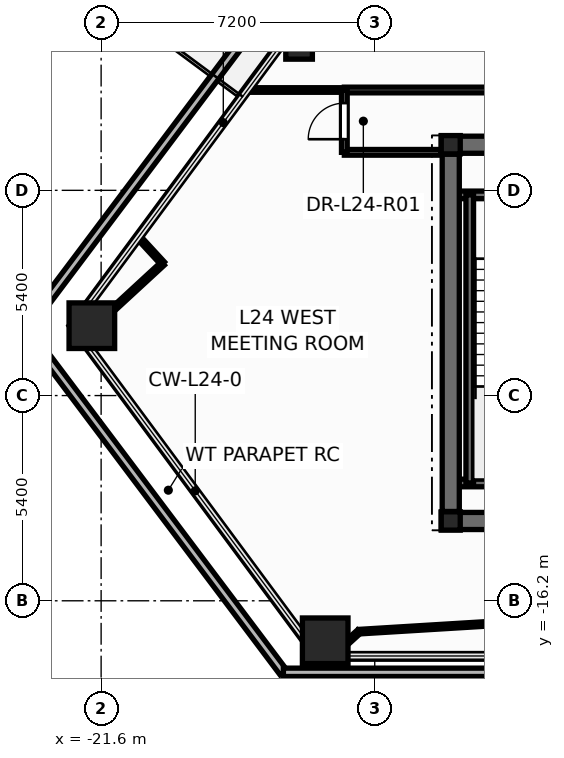
"""IFC4 building model, lengths in metres.
Left out: names, types, materials, properties, quantities, classifications, styles, units other than length and angle.
Written with IfcOpenShell. Run it as: python <this file> out.ifc"""

import sys

from ifc_helpers import new_model, si_unit, direction, frame, frame_2d, origin, origin_2d, place, context, subcontext, project, spatial, rectangle, hollow_rectangle, hollow_circle, i_section, extrude, element, fill, save


model = new_model("IFC4")
c1 = context("Model", 3, precision=1e-05, world=origin(), true_north=direction((0.0, 1.0)))
c2 = subcontext(c1, "Body", "Model", "MODEL_VIEW")
j1 = project(units=[si_unit("LENGTHUNIT", "METRE"), si_unit("PLANEANGLEUNIT", "RADIAN")], contexts=[c1])
p1 = place(None, origin())
s1 = spatial("IfcSite", under=j1, at=p1, CompositionType="ELEMENT")
p2 = place(p1, origin())
s2 = spatial("IfcBuilding", under=s1, at=p2, CompositionType="ELEMENT")
p3 = place(p2, frame((0.0, 0.0, 94.8)))
s3 = spatial("IfcBuildingStorey", under=s2, at=p3, CompositionType="ELEMENT", Elevation=94.8)
for number, where, z_axis, x_axis in (
    (1, (-21.844, -8.961, 0.0), (0.0, 0.0, 1.0), (1.0, 0.0, 0.0)),
    (2, (-15.704, -17.252, 0.0), (0.0, 0.0, 1.0), (1.0, 0.0, 0.0)),
):
    element("IfcColumn", number, at=place(p3, frame(where, z_axis=z_axis, x_axis=x_axis)), inside=s3, PredefinedType="COLUMN", context=c2, shape_type="SweptSolid", body=[
        extrude(hollow_rectangle(XDim=1.2, YDim=1.2, WallThickness=0.055, at=origin_2d()), origin(), (0.0, 0.0, 1.0), 4.8),
    ])
p4 = place(p3, frame((-16.391, -1.599, 0.0), z_axis=(0.0, 0.0, 1.0), x_axis=(1.0, 0.0, 0.0)))
e3 = element("IfcColumn", 3, at=p4, inside=s3, PredefinedType="COLUMN", context=c2, shape_type="SweptSolid", body=[
    extrude(hollow_circle(Radius=0.35, WallThickness=0.03, at=origin_2d()), origin(), (0.0, 0.0, 1.0), 4.8),
])
for number, where, z_axis, x_axis in (
    (4, (-12.4, -14.1, 0.0), (0.0, 0.0, 1.0), (1.0, 0.0, 0.0)),
    (5, (-12.4, -4.2, 0.0), (0.0, 0.0, 1.0), (1.0, 0.0, 0.0)),
):
    element("IfcColumn", number, at=place(p3, frame(where, z_axis=z_axis, x_axis=x_axis)), inside=s3, PredefinedType="COLUMN", context=c2, shape_type="SweptSolid", body=[
        extrude(i_section(OverallWidth=0.5, OverallDepth=0.482, WebThickness=0.04, FlangeThickness=0.045, at=origin_2d()), origin(), (0.0, 0.0, 1.0), 4.8),
    ])
p5 = place(p3, frame((-23.595, -9.052, -0.02), z_axis=(0.0, 0.0, 1.0), x_axis=(0.601053883543, -0.79920850163, 0.0)))
e6 = element("IfcWall", 6, at=p5, inside=s3, PredefinedType="PARAPET", context=c2, shape_type="SweptSolid", body=[
    extrude(rectangle(XDim=11.299, YDim=0.22, at=frame_2d((5.65, 0.0))), origin(), (0.0, 0.0, 1.0), 1.17),
])
p6 = place(p3, frame((-16.803, -18.082, -0.02), z_axis=(0.0, 0.0, 1.0), x_axis=(1.0, 0.0, 0.0)))
e7 = element("IfcWall", 7, at=p6, inside=s3, PredefinedType="PARAPET", context=c2, shape_type="SweptSolid", body=[
    extrude(rectangle(XDim=33.607, YDim=0.22, at=frame_2d((16.803, 0.0))), origin(), (0.0, 0.0, 1.0), 1.17),
])
p7 = place(p3, frame((-6.827, 13.245, -0.02), z_axis=(0.0, 0.0, 1.0), x_axis=(-0.601046808783, -0.799213822235, 0.0)))
e8 = element("IfcWall", 8, at=p7, inside=s3, PredefinedType="PARAPET", context=c2, shape_type="SweptSolid", body=[
    extrude(rectangle(XDim=27.898, YDim=0.22, at=frame_2d((13.949, 0.0))), origin(), (0.0, 0.0, 1.0), 1.17),
])
p8 = place(p3, frame((-12.65, -14.1, 0.0), z_axis=(0.0, 0.0, 1.0), x_axis=(1.0, 0.0, 0.0)))
e9 = element("IfcWall", 9, at=p8, inside=s3, PredefinedType="SHEAR", context=c2, shape_type="SweptSolid", body=[
    extrude(rectangle(XDim=25.3, YDim=0.45, at=frame_2d((12.65, 0.0))), origin(), (0.0, 0.0, 1.0), 4.8),
])
p9 = place(p3, frame((-12.65, -4.2, 0.0), z_axis=(0.0, 0.0, 1.0), x_axis=(1.0, 0.0, 0.0)))
e10 = element("IfcWall", 10, at=p9, inside=s3, PredefinedType="SHEAR", context=c2, shape_type="SweptSolid", body=[
    extrude(rectangle(XDim=25.3, YDim=0.45, at=frame_2d((12.65, 0.0))), origin(), (0.0, 0.0, 1.0), 4.8),
])
p10 = place(p9, frame((1.85, 0.0, 0.0)))
e11 = element("IfcOpeningElement", 11, at=p10, cuts=e10, PredefinedType="OPENING", context=c2, shape_type="SweptSolid", body=[
    extrude(rectangle(XDim=0.756, YDim=2.054, at=frame_2d((0.375, 1.027))), frame((0.0, 0.235, 0.0), z_axis=(0.0, -1.0, 0.0), x_axis=(1.0, 0.0, 0.0)), (0.0, 0.0, 1.0), 0.47),
])
p11 = place(p9, frame((22.65, 0.0, 0.0)))
e12 = element("IfcOpeningElement", 12, at=p11, cuts=e10, PredefinedType="OPENING", context=c2, shape_type="SweptSolid", body=[
    extrude(rectangle(XDim=0.756, YDim=2.054, at=frame_2d((0.375, 1.027))), frame((0.0, 0.235, 0.0), z_axis=(0.0, -1.0, 0.0), x_axis=(1.0, 0.0, 0.0)), (0.0, 0.0, 1.0), 0.47),
])
p12 = place(p9, frame((5.85, 0.0, 0.0)))
e13 = element("IfcOpeningElement", 13, at=p12, cuts=e10, PredefinedType="OPENING", context=c2, shape_type="SweptSolid", body=[
    extrude(rectangle(XDim=1.006, YDim=2.104, at=frame_2d((0.5, 1.052))), frame((0.0, 0.235, 0.0), z_axis=(0.0, -1.0, 0.0), x_axis=(1.0, 0.0, 0.0)), (0.0, 0.0, 1.0), 0.47),
])
p13 = place(p9, frame((10.35, 0.0, 0.0)))
e14 = element("IfcOpeningElement", 14, at=p13, cuts=e10, PredefinedType="OPENING", context=c2, shape_type="SweptSolid", body=[
    extrude(rectangle(XDim=1.406, YDim=2.154, at=frame_2d((0.7, 1.077))), frame((0.0, 0.235, 0.0), z_axis=(0.0, -1.0, 0.0), x_axis=(1.0, 0.0, 0.0)), (0.0, 0.0, 1.0), 0.47),
])
p14 = place(p9, frame((18.45, 0.0, 0.0)))
e15 = element("IfcOpeningElement", 15, at=p14, cuts=e10, PredefinedType="OPENING", context=c2, shape_type="SweptSolid", body=[
    extrude(rectangle(XDim=1.006, YDim=2.104, at=frame_2d((0.5, 1.052))), frame((0.0, 0.235, 0.0), z_axis=(0.0, -1.0, 0.0), x_axis=(1.0, 0.0, 0.0)), (0.0, 0.0, 1.0), 0.47),
])
for number, where, z_axis, x_axis in (
    (16, (-12.35, -5.52, 0.0), (0.0, 0.0, 1.0), (1.0, 0.0, 0.0)),
    (17, (-12.35, -13.1, 0.0), (0.0, 0.0, 1.0), (1.0, 0.0, 0.0)),
):
    element("IfcWall", number, at=place(p3, frame(where, z_axis=z_axis, x_axis=x_axis)), inside=s3, PredefinedType="SOLIDWALL", context=c2, shape_type="SweptSolid", body=[
        extrude(rectangle(XDim=3.87, YDim=0.2, at=frame_2d((1.935, 0.0))), origin(), (0.0, 0.0, 1.0), 4.8),
    ])
p15 = place(p3, frame((-11.9, -13.1, 0.0), z_axis=(0.0, 0.0, 1.0), x_axis=(0.0, 1.0, 0.0)))
e18 = element("IfcWall", 18, at=p15, inside=s3, PredefinedType="SOLIDWALL", context=c2, shape_type="SweptSolid", body=[
    extrude(rectangle(XDim=7.58, YDim=0.2, at=frame_2d((3.79, 0.0))), origin(), (0.0, 0.0, 1.0), 4.8),
])
p16 = place(p3, frame((-12.4, -13.85, 0.0), z_axis=(0.0, 0.0, 1.0), x_axis=(0.0, 1.0, 0.0)))
e19 = element("IfcWall", 19, at=p16, inside=s3, PredefinedType="SHEAR", context=c2, shape_type="SweptSolid", body=[
    extrude(rectangle(XDim=9.4, YDim=0.45, at=frame_2d((4.7, 0.0))), origin(), (0.0, 0.0, 1.0), 4.8),
])
p17 = place(p3, frame((-15.2, -2.76, 0.0), z_axis=(0.0, 0.0, 1.0), x_axis=(1.0, 0.0, 0.0)))
e20 = element("IfcWall", 20, at=p17, inside=s3, PredefinedType="PARTITIONING", context=c2, shape_type="SweptSolid", body=[
    extrude(rectangle(XDim=12.86, YDim=0.15, at=frame_2d((6.43, 0.0))), origin(), (0.0, 0.0, 1.0), 3.525),
])
p18 = place(p17, frame((4.436, 0.0, 0.0)))
e21 = element("IfcOpeningElement", 21, at=p18, cuts=e20, PredefinedType="OPENING", context=c2, shape_type="SweptSolid", body=[
    extrude(rectangle(XDim=0.956, YDim=2.104, at=frame_2d((0.475, 1.052))), frame((0.0, 0.085, 0.0), z_axis=(0.0, -1.0, 0.0), x_axis=(1.0, 0.0, 0.0)), (0.0, 0.0, 1.0), 0.17),
])
p19 = place(p3, frame((-14.815, -17.012, 0.0), z_axis=(0.0, 0.0, 1.0), x_axis=(0.998142834765, 0.060917004252, 0.0)))
e22 = element("IfcWall", 22, at=p19, inside=s3, PredefinedType="PARTITIONING", context=c2, shape_type="SweptSolid", body=[
    extrude(rectangle(XDim=3.651, YDim=0.12, at=frame_2d((1.826, 0.0))), origin(), (0.0, 0.0, 1.0), 4.55),
])
p20 = place(p3, frame((-15.2, -4.4, 0.0), z_axis=(0.0, 0.0, 1.0), x_axis=(1.0, 0.0, 0.0)))
e23 = element("IfcWall", 23, at=p20, inside=s3, PredefinedType="PARTITIONING", context=c2, shape_type="SweptSolid", body=[
    extrude(rectangle(XDim=2.548, YDim=0.15, at=frame_2d((1.274, 0.0))), origin(), (0.0, 0.0, 1.0), 3.525),
])
p21 = place(p3, frame((-17.749, -2.76, 0.0), z_axis=(0.0, 0.0, 1.0), x_axis=(1.0, 0.0, 0.0)))
e24 = element("IfcWall", 24, at=p21, inside=s3, PredefinedType="PARTITIONING", context=c2, shape_type="SweptSolid", body=[
    extrude(rectangle(XDim=2.549, YDim=0.12, at=frame_2d((1.274, 0.0))), origin(), (0.0, 0.0, 1.0), 3.913),
])
p22 = place(p3, frame((-19.977, -7.325, 0.0), z_axis=(0.0, 0.0, 1.0), x_axis=(-0.735328734055, -0.677710596695, 0.0)))
e25 = element("IfcWall", 25, at=p22, inside=s3, PredefinedType="PARTITIONING", context=c2, shape_type="SweptSolid", body=[
    extrude(rectangle(XDim=2.013, YDim=0.12, at=frame_2d((1.006, 0.0))), origin(), (0.0, 0.0, 1.0), 3.525),
])
p23 = place(p3, frame((-15.2, -4.4, 0.0), z_axis=(0.0, 0.0, 1.0), x_axis=(0.0, 1.0, 0.0)))
e26 = element("IfcWall", 26, at=p23, inside=s3, PredefinedType="PARTITIONING", context=c2, shape_type="SweptSolid", body=[
    extrude(rectangle(XDim=1.64, YDim=0.15, at=frame_2d((0.82, 0.0))), origin(), (0.0, 0.0, 1.0), 4.55),
])
p24 = place(p23, frame((0.345, 0.0, 0.0)))
e27 = element("IfcOpeningElement", 27, at=p24, cuts=e26, PredefinedType="OPENING", context=c2, shape_type="SweptSolid", body=[
    extrude(rectangle(XDim=0.956, YDim=2.104, at=frame_2d((0.475, 1.052))), frame((0.0, 0.085, 0.0), z_axis=(0.0, -1.0, 0.0), x_axis=(1.0, 0.0, 0.0)), (0.0, 0.0, 1.0), 0.17),
])
p25 = place(p3, frame((-20.609, -6.639, 0.0), z_axis=(0.0, 0.0, 1.0), x_axis=(0.677725423192, -0.735315069041, 0.0)))
e28 = element("IfcWall", 28, at=p25, inside=s3, PredefinedType="PARTITIONING", context=c2, shape_type="SweptSolid", body=[
    extrude(rectangle(XDim=0.933, YDim=0.12, at=frame_2d((0.466, 0.0))), origin(), (0.0, 0.0, 1.0), 3.913),
])
p26 = place(p3, frame((-15.448, -17.585, 0.0), z_axis=(0.0, 0.0, 1.0), x_axis=(0.741311885278, 0.671160702623, 0.0)))
e29 = element("IfcWall", 29, at=p26, inside=s3, PredefinedType="PARTITIONING", context=c2, shape_type="SweptSolid", body=[
    extrude(rectangle(XDim=0.853, YDim=0.12, at=frame_2d((0.426, 0.0))), origin(), (0.0, 0.0, 1.0), 3.913),
])
p27 = place(p3, frame((-21.457, -8.689, 0.0), z_axis=(0.0, 0.0, 1.0), x_axis=(-0.988441697341, -0.151601487322, 0.0)))
e30 = element("IfcWall", 30, at=p27, inside=s3, PredefinedType="PARTITIONING", context=c2, shape_type="SweptSolid", body=[
    extrude(rectangle(XDim=0.765, YDim=0.12, at=frame_2d((0.382, 0.0))), origin(), (0.0, 0.0, 1.0), 3.525),
])
p28 = place(p24, origin())
e31 = element("IfcDoor", 31, at=p28, inside=s3, OperationType="SINGLE_SWING_LEFT", PredefinedType="DOOR", context=c2, shape_type="SweptSolid", body=[
    extrude(rectangle(XDim=0.95, YDim=2.1, at=frame_2d((0.475, 1.05))), frame((0.0, 0.025, 0.0), z_axis=(0.0, -1.0, 0.0), x_axis=(1.0, 0.0, 0.0)), (0.0, 0.0, 1.0), 0.05),
])
fill(e27, e31)
save(model, sys.argv[1])
